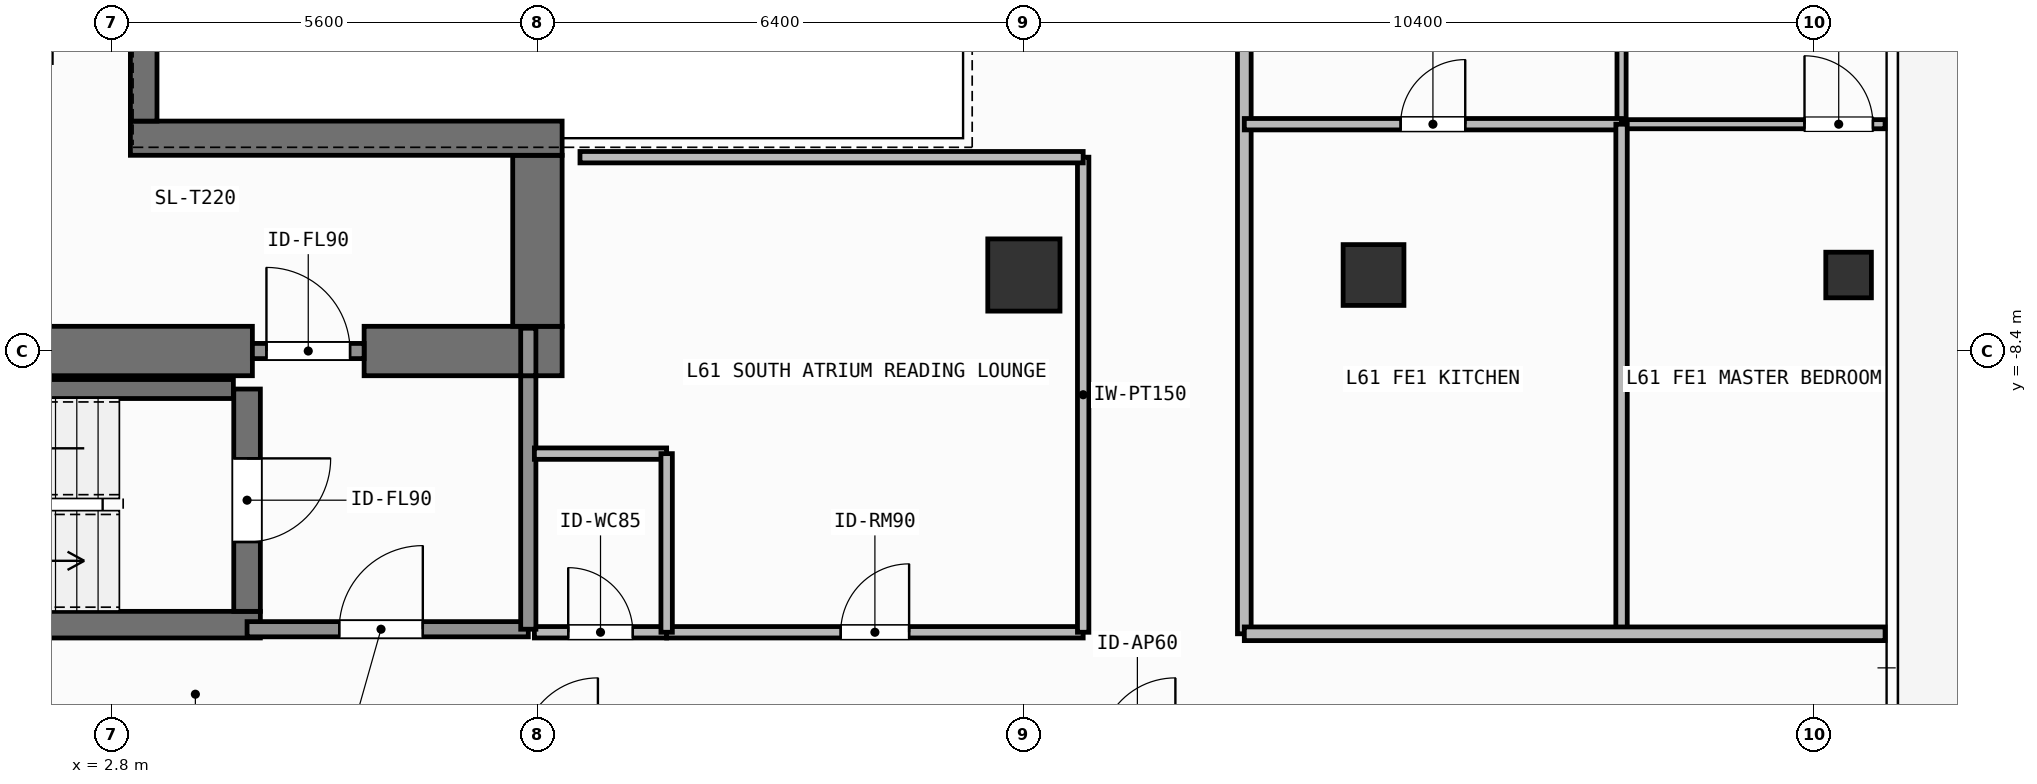
"""IFC4 building model, lengths in metres.
Left out: names, types, materials, properties, quantities, classifications, styles, units other than length and angle.
Written with IfcOpenShell. Run it as: python <this file> out.ifc"""

import sys

from ifc_helpers import new_model, si_unit, direction, frame, frame_2d, origin, origin_2d, place, context, subcontext, project, spatial, rectangle, hollow_rectangle, extrude, element, fill, save


model = new_model("IFC4")
c1 = context("Model", 3, precision=1e-05, world=origin(), true_north=direction((0.0, 1.0)))
c2 = subcontext(c1, "Body", "Model", "MODEL_VIEW")
j1 = project(units=[si_unit("LENGTHUNIT", "METRE"), si_unit("PLANEANGLEUNIT", "RADIAN")], contexts=[c1])
p1 = place(None, origin())
s1 = spatial("IfcSite", under=j1, at=p1, CompositionType="ELEMENT")
p2 = place(p1, origin())
s2 = spatial("IfcBuilding", under=s1, at=p2, CompositionType="ELEMENT")
p3 = place(p2, frame((0.0, 0.0, 250.8)))
s3 = spatial("IfcBuildingStorey", under=s2, at=p3, CompositionType="ELEMENT", Elevation=250.8)
p4 = place(p3, frame((-2.62, -8.4, 0.0), z_axis=(0.0, 0.0, 1.0), x_axis=(1.0, 0.0, 0.0)))
e1 = element("IfcWall", 1, at=p4, inside=s3, PredefinedType="SHEAR", context=c2, shape_type="SweptSolid", body=[
    extrude(rectangle(XDim=7.27, YDim=0.65, at=frame_2d((3.635, 0.0))), origin(), (0.0, 0.0, 1.0), 3.9),
])
p5 = place(p3, frame((6.12, -8.4, 0.0), z_axis=(0.0, 0.0, 1.0), x_axis=(1.0, 0.0, 0.0)))
e2 = element("IfcWall", 2, at=p5, inside=s3, PredefinedType="SHEAR", context=c2, shape_type="SweptSolid", body=[
    extrude(rectangle(XDim=2.605, YDim=0.65, at=frame_2d((1.302, 0.0))), origin(), (0.0, 0.0, 1.0), 3.9),
])
p6 = place(p3, frame((8.4, -8.075, 0.0), z_axis=(0.0, 0.0, 1.0), x_axis=(0.0, 1.0, 0.0)))
e3 = element("IfcWall", 3, at=p6, inside=s3, PredefinedType="SHEAR", context=c2, shape_type="SweptSolid", body=[
    extrude(rectangle(XDim=2.25, YDim=0.65, at=frame_2d((1.125, 0.0))), origin(), (0.0, 0.0, 1.0), 3.9),
])
p7 = place(p3, frame((3.045, -5.6, 0.0), z_axis=(0.0, 0.0, 1.0), x_axis=(1.0, 0.0, 0.0)))
e4 = element("IfcWall", 4, at=p7, inside=s3, PredefinedType="SHEAR", context=c2, shape_type="SweptSolid", body=[
    extrude(rectangle(XDim=5.68, YDim=0.45, at=frame_2d((2.84, 0.0))), origin(), (0.0, 0.0, 1.0), 3.9),
])
p8 = place(p3, frame((3.22, -5.375, 0.0), z_axis=(0.0, 0.0, 1.0), x_axis=(0.0, 1.0, 0.0)))
e5 = element("IfcWall", 5, at=p8, inside=s3, PredefinedType="SHEAR", context=c2, shape_type="SweptSolid", body=[
    extrude(rectangle(XDim=10.75, YDim=0.35, at=frame_2d((5.375, 0.0))), origin(), (0.0, 0.0, 1.0), 3.9),
])
p9 = place(p3, frame((-2.555, -12.0, 0.0), z_axis=(0.0, 0.0, 1.0), x_axis=(1.0, 0.0, 0.0)))
e6 = element("IfcWall", 6, at=p9, inside=s3, PredefinedType="SHEAR", context=c2, shape_type="SweptSolid", body=[
    extrude(rectangle(XDim=7.31, YDim=0.35, at=frame_2d((3.655, 0.0))), origin(), (0.0, 0.0, 1.0), 3.9),
])
p10 = place(p3, frame((-2.2, -8.9, 0.0), z_axis=(0.0, 0.0, 1.0), x_axis=(1.0, 0.0, 0.0)))
e7 = element("IfcWall", 7, at=p10, inside=s3, PredefinedType="SHEAR", context=c2, shape_type="SweptSolid", body=[
    extrude(rectangle(XDim=6.6, YDim=0.25, at=frame_2d((3.3, 0.0))), origin(), (0.0, 0.0, 1.0), 3.9),
])
p11 = place(p3, frame((4.58, -8.9, 0.0), z_axis=(0.0, 0.0, 1.0), x_axis=(0.0, -1.0, 0.0)))
e8 = element("IfcWall", 8, at=p11, inside=s3, PredefinedType="SHEAR", context=c2, shape_type="SweptSolid", body=[
    extrude(rectangle(XDim=2.925, YDim=0.35, at=frame_2d((1.462, 0.0))), origin(), (0.0, 0.0, 1.0), 3.9),
])
p12 = place(p11, frame((0.913, 0.0, 0.0)))
e9 = element("IfcOpeningElement", 9, at=p12, cuts=e8, PredefinedType="OPENING", context=c2, shape_type="SweptSolid", body=[
    extrude(rectangle(XDim=1.1, YDim=2.15, at=frame_2d((0.55, 1.075))), frame((0.0, 0.185, 0.0), z_axis=(0.0, -1.0, 0.0), x_axis=(1.0, 0.0, 0.0)), (0.0, 0.0, 1.0), 0.37),
])
p13 = place(p3, frame((14.8, -7.4, 0.0), z_axis=(0.0, 0.0, 1.0), x_axis=(1.0, 0.0, 0.0)))
e10 = element("IfcColumn", 10, at=p13, inside=s3, PredefinedType="COLUMN", context=c2, shape_type="SweptSolid", body=[
    extrude(rectangle(XDim=0.95, YDim=0.95, at=origin_2d()), origin(), (0.0, 0.0, 1.0), 3.9),
])
p14 = place(p3, frame((19.4, -7.4, 0.0), z_axis=(0.0, 0.0, 1.0), x_axis=(1.0, 0.0, 0.0)))
e11 = element("IfcColumn", 11, at=p14, inside=s3, PredefinedType="COLUMN", context=c2, shape_type="SweptSolid", body=[
    extrude(hollow_rectangle(XDim=0.8, YDim=0.8, WallThickness=0.036, at=origin_2d()), origin(), (0.0, 0.0, 1.0), 3.9),
])
p15 = place(p3, frame((25.65, -7.4, 0.0), z_axis=(0.0, 0.0, 1.0), x_axis=(1.0, 0.0, 0.0)))
e12 = element("IfcColumn", 12, at=p15, inside=s3, PredefinedType="COLUMN", context=c2, shape_type="SweptSolid", body=[
    extrude(hollow_rectangle(XDim=0.6, YDim=0.6, WallThickness=0.028, at=origin_2d()), origin(), (0.0, 0.0, 1.0), 3.9),
])
p16 = place(p3, frame((4.58, -12.06, 0.0), z_axis=(0.0, 0.0, 1.0), x_axis=(1.0, 0.0, 0.0)))
e13 = element("IfcWall", 13, at=p16, inside=s3, PredefinedType="SOLIDWALL", context=c2, shape_type="SweptSolid", body=[
    extrude(rectangle(XDim=3.7, YDim=0.2, at=frame_2d((1.85, 0.0))), origin(), (0.0, 0.0, 1.0), 3.62),
])
p17 = place(p16, frame((1.212, 0.0, 0.0)))
e14 = element("IfcOpeningElement", 14, at=p17, cuts=e13, PredefinedType="OPENING", context=c2, shape_type="SweptSolid", body=[
    extrude(rectangle(XDim=1.1, YDim=2.15, at=frame_2d((0.55, 1.075))), frame((0.0, 0.11, 0.0), z_axis=(0.0, -1.0, 0.0), x_axis=(1.0, 0.0, 0.0)), (0.0, 0.0, 1.0), 0.22),
])
p18 = place(p3, frame((4.65, -8.4, 0.0), z_axis=(0.0, 0.0, 1.0), x_axis=(1.0, 0.0, 0.0)))
e15 = element("IfcWall", 15, at=p18, inside=s3, PredefinedType="SOLIDWALL", context=c2, shape_type="SweptSolid", body=[
    extrude(rectangle(XDim=1.47, YDim=0.2, at=frame_2d((0.735, 0.0))), origin(), (0.0, 0.0, 1.0), 2.86),
])
p19 = place(p18, frame((0.185, 0.0, 0.0)))
e16 = element("IfcOpeningElement", 16, at=p19, cuts=e15, PredefinedType="OPENING", context=c2, shape_type="SweptSolid", body=[
    extrude(rectangle(XDim=1.1, YDim=2.15, at=frame_2d((0.55, 1.075))), frame((0.0, 0.11, 0.0), z_axis=(0.0, -1.0, 0.0), x_axis=(1.0, 0.0, 0.0)), (0.0, 0.0, 1.0), 0.22),
])
p20 = place(p3, frame((8.36, -12.1, 0.0), z_axis=(0.0, 0.0, 1.0), x_axis=(1.0, 0.0, 0.0)))
e17 = element("IfcWall", 17, at=p20, inside=s3, PredefinedType="PARTITIONING", context=c2, shape_type="SweptSolid", body=[
    extrude(rectangle(XDim=1.74, YDim=0.15, at=frame_2d((0.87, 0.0))), origin(), (0.0, 0.0, 1.0), 3.62),
])
p21 = place(p20, frame((0.445, 0.0, 0.0)))
e18 = element("IfcOpeningElement", 18, at=p21, cuts=e17, PredefinedType="OPENING", context=c2, shape_type="SweptSolid", body=[
    extrude(rectangle(XDim=0.85, YDim=2.1, at=frame_2d((0.425, 1.05))), frame((0.0, 0.085, 0.0), z_axis=(0.0, -1.0, 0.0), x_axis=(1.0, 0.0, 0.0)), (0.0, 0.0, 1.0), 0.17),
])
p22 = place(p3, frame((10.1, -12.1, 0.0), z_axis=(0.0, 0.0, 1.0), x_axis=(1.0, 0.0, 0.0)))
e19 = element("IfcWall", 19, at=p22, inside=s3, PredefinedType="PARTITIONING", context=c2, shape_type="SweptSolid", body=[
    extrude(rectangle(XDim=5.48, YDim=0.15, at=frame_2d((2.74, 0.0))), origin(), (0.0, 0.0, 1.0), 3.62),
])
p23 = place(p22, frame((2.29, 0.0, 0.0)))
e20 = element("IfcOpeningElement", 20, at=p23, cuts=e19, PredefinedType="OPENING", context=c2, shape_type="SweptSolid", body=[
    extrude(rectangle(XDim=0.9, YDim=2.1, at=frame_2d((0.45, 1.05))), frame((0.0, 0.085, 0.0), z_axis=(0.0, -1.0, 0.0), x_axis=(1.0, 0.0, 0.0)), (0.0, 0.0, 1.0), 0.17),
])
p24 = place(p3, frame((17.7, -12.12, 0.0), z_axis=(0.0, 0.0, 1.0), x_axis=(0.0, 1.0, 0.0)))
e21 = element("IfcWall", 21, at=p24, inside=s3, PredefinedType="PARTITIONING", context=c2, shape_type="SweptSolid", body=[
    extrude(rectangle(XDim=23.55, YDim=0.18, at=frame_2d((11.775, 0.0))), origin(), (0.0, 0.0, 1.0), 3.62),
])
p25 = place(p24, frame((11.454, 0.0, 0.0)))
e22 = element("IfcOpeningElement", 22, at=p25, cuts=e21, PredefinedType="OPENING", context=c2, shape_type="SweptSolid", body=[
    extrude(rectangle(XDim=1.0, YDim=2.2, at=frame_2d((0.5, 1.1))), frame((0.0, 0.1, 0.0), z_axis=(0.0, -1.0, 0.0), x_axis=(1.0, 0.0, 0.0)), (0.0, 0.0, 1.0), 0.2),
])
p26 = place(p3, frame((22.663, -5.416, 0.0), z_axis=(0.0, 0.0, 1.0), x_axis=(0.0, 1.0, 0.0)))
e23 = element("IfcWall", 23, at=p26, inside=s3, PredefinedType="PARTITIONING", context=c2, shape_type="SweptSolid", body=[
    extrude(rectangle(XDim=10.698, YDim=0.12, at=frame_2d((5.349, 0.0))), origin(), (0.0, 0.0, 1.0), 3.62),
])
p27 = place(p26, frame((4.81, 0.0, 0.0)))
e24 = element("IfcOpeningElement", 24, at=p27, cuts=e23, PredefinedType="OPENING", context=c2, shape_type="SweptSolid", body=[
    extrude(rectangle(XDim=0.9, YDim=2.1, at=frame_2d((0.45, 1.05))), frame((0.0, 0.07, 0.0), z_axis=(0.0, -1.0, 0.0), x_axis=(1.0, 0.0, 0.0)), (0.0, 0.0, 1.0), 0.14),
])
p28 = place(p3, frame((17.7, -5.416, 0.0), z_axis=(0.0, 0.0, 1.0), x_axis=(1.0, 0.0, 0.0)))
e25 = element("IfcWall", 25, at=p28, inside=s3, PredefinedType="PARTITIONING", context=c2, shape_type="SweptSolid", body=[
    extrude(rectangle(XDim=4.963, YDim=0.15, at=frame_2d((2.481, 0.0))), origin(), (0.0, 0.0, 1.0), 3.62),
])
p29 = place(p28, frame((2.056, 0.0, 0.0)))
e26 = element("IfcOpeningElement", 26, at=p29, cuts=e25, PredefinedType="OPENING", context=c2, shape_type="SweptSolid", body=[
    extrude(rectangle(XDim=0.85, YDim=2.1, at=frame_2d((0.425, 1.05))), frame((0.0, 0.085, 0.0), z_axis=(0.0, -1.0, 0.0), x_axis=(1.0, 0.0, 0.0)), (0.0, 0.0, 1.0), 0.17),
])
p30 = place(p3, frame((22.663, -5.416, 0.0), z_axis=(0.0, 0.0, 1.0), x_axis=(1.0, 0.0, 0.0)))
e27 = element("IfcWall", 27, at=p30, inside=s3, PredefinedType="PARTITIONING", context=c2, shape_type="SweptSolid", body=[
    extrude(rectangle(XDim=3.467, YDim=0.12, at=frame_2d((1.733, 0.0))), origin(), (0.0, 0.0, 1.0), 3.62),
])
p31 = place(p30, frame((2.407, 0.0, 0.0)))
e28 = element("IfcOpeningElement", 28, at=p31, cuts=e27, PredefinedType="OPENING", context=c2, shape_type="SweptSolid", body=[
    extrude(rectangle(XDim=0.9, YDim=2.1, at=frame_2d((0.45, 1.05))), frame((0.0, 0.07, 0.0), z_axis=(0.0, -1.0, 0.0), x_axis=(1.0, 0.0, 0.0)), (0.0, 0.0, 1.0), 0.14),
])
p32 = place(p3, frame((8.28, -12.06, 0.0), z_axis=(0.0, 0.0, 1.0), x_axis=(0.0, 1.0, 0.0)))
e29 = element("IfcWall", 29, at=p32, inside=s3, PredefinedType="SOLIDWALL", context=c2, shape_type="SweptSolid", body=[
    extrude(rectangle(XDim=3.335, YDim=0.2, at=frame_2d((1.667, 0.0))), origin(), (0.0, 0.0, 1.0), 3.62),
])
p33 = place(p3, frame((8.28, -8.725, 0.0), z_axis=(0.0, 0.0, 1.0), x_axis=(0.0, 1.0, 0.0)))
e30 = element("IfcWall", 30, at=p33, inside=s3, PredefinedType="SOLIDWALL", context=c2, shape_type="SweptSolid", body=[
    extrude(rectangle(XDim=0.625, YDim=0.2, at=frame_2d((0.312, 0.0))), origin(), (0.0, 0.0, 1.0), 3.62),
])
p34 = place(p3, frame((8.36, -9.75, 0.0), z_axis=(0.0, 0.0, 1.0), x_axis=(1.0, 0.0, 0.0)))
e31 = element("IfcWall", 31, at=p34, inside=s3, PredefinedType="PARTITIONING", context=c2, shape_type="SweptSolid", body=[
    extrude(rectangle(XDim=1.74, YDim=0.15, at=frame_2d((0.87, 0.0))), origin(), (0.0, 0.0, 1.0), 3.62),
])
p35 = place(p3, frame((10.1, -12.1, 0.0), z_axis=(0.0, 0.0, 1.0), x_axis=(0.0, 1.0, 0.0)))
e32 = element("IfcWall", 32, at=p35, inside=s3, PredefinedType="PARTITIONING", context=c2, shape_type="SweptSolid", body=[
    extrude(rectangle(XDim=2.35, YDim=0.15, at=frame_2d((1.175, 0.0))), origin(), (0.0, 0.0, 1.0), 3.62),
])
p36 = place(p3, frame((15.58, -12.1, 0.0), z_axis=(0.0, 0.0, 1.0), x_axis=(0.0, 1.0, 0.0)))
e33 = element("IfcWall", 33, at=p36, inside=s3, PredefinedType="PARTITIONING", context=c2, shape_type="SweptSolid", body=[
    extrude(rectangle(XDim=6.25, YDim=0.15, at=frame_2d((3.125, 0.0))), origin(), (0.0, 0.0, 1.0), 3.62),
])
p37 = place(p3, frame((8.96, -5.85, 0.0), z_axis=(0.0, 0.0, 1.0), x_axis=(1.0, 0.0, 0.0)))
e34 = element("IfcWall", 34, at=p37, inside=s3, PredefinedType="PARTITIONING", context=c2, shape_type="SweptSolid", body=[
    extrude(rectangle(XDim=6.62, YDim=0.15, at=frame_2d((3.31, 0.0))), origin(), (0.0, 0.0, 1.0), 3.62),
])
p38 = place(p3, frame((22.663, -12.12, 0.0), z_axis=(0.0, 0.0, 1.0), x_axis=(0.0, 1.0, 0.0)))
e35 = element("IfcWall", 35, at=p38, inside=s3, PredefinedType="PARTITIONING", context=c2, shape_type="SweptSolid", body=[
    extrude(rectangle(XDim=6.704, YDim=0.15, at=frame_2d((3.352, 0.0))), origin(), (0.0, 0.0, 1.0), 3.62),
])
p39 = place(p3, frame((17.7, -12.12, 0.0), z_axis=(0.0, 0.0, 1.0), x_axis=(1.0, 0.0, 0.0)))
e36 = element("IfcWall", 36, at=p39, inside=s3, PredefinedType="PARTITIONING", context=c2, shape_type="SweptSolid", body=[
    extrude(rectangle(XDim=8.43, YDim=0.18, at=frame_2d((4.215, 0.0))), origin(), (0.0, 0.0, 1.0), 3.62),
])
p40 = place(p12, origin())
e37 = element("IfcDoor", 37, at=p40, inside=s3, OperationType="SINGLE_SWING_LEFT", PredefinedType="DOOR", context=c2, shape_type="SweptSolid", body=[
    extrude(rectangle(XDim=1.1, YDim=2.15, at=frame_2d((0.55, 1.075))), frame((0.0, 0.025, 0.0), z_axis=(0.0, -1.0, 0.0), x_axis=(1.0, 0.0, 0.0)), (0.0, 0.0, 1.0), 0.05),
])
fill(e9, e37)
p41 = place(p17, origin())
e38 = element("IfcDoor", 38, at=p41, inside=s3, OperationType="SINGLE_SWING_RIGHT", PredefinedType="DOOR", context=c2, shape_type="SweptSolid", body=[
    extrude(rectangle(XDim=1.1, YDim=2.15, at=frame_2d((0.55, 1.075))), frame((0.0, 0.025, 0.0), z_axis=(0.0, -1.0, 0.0), x_axis=(1.0, 0.0, 0.0)), (0.0, 0.0, 1.0), 0.05),
])
fill(e14, e38)
p42 = place(p19, origin())
e39 = element("IfcDoor", 39, at=p42, inside=s3, OperationType="SINGLE_SWING_LEFT", PredefinedType="DOOR", context=c2, shape_type="SweptSolid", body=[
    extrude(rectangle(XDim=1.1, YDim=2.15, at=frame_2d((0.55, 1.075))), frame((0.0, 0.025, 0.0), z_axis=(0.0, -1.0, 0.0), x_axis=(1.0, 0.0, 0.0)), (0.0, 0.0, 1.0), 0.05),
])
fill(e16, e39)
p43 = place(p21, origin())
e40 = element("IfcDoor", 40, at=p43, inside=s3, OperationType="SINGLE_SWING_LEFT", PredefinedType="DOOR", context=c2, shape_type="SweptSolid", body=[
    extrude(rectangle(XDim=0.85, YDim=2.1, at=frame_2d((0.425, 1.05))), frame((0.0, 0.025, 0.0), z_axis=(0.0, -1.0, 0.0), x_axis=(1.0, 0.0, 0.0)), (0.0, 0.0, 1.0), 0.05),
])
fill(e18, e40)
p44 = place(p23, origin())
e41 = element("IfcDoor", 41, at=p44, inside=s3, OperationType="SINGLE_SWING_RIGHT", PredefinedType="DOOR", context=c2, shape_type="SweptSolid", body=[
    extrude(rectangle(XDim=0.9, YDim=2.1, at=frame_2d((0.45, 1.05))), frame((0.0, 0.025, 0.0), z_axis=(0.0, -1.0, 0.0), x_axis=(1.0, 0.0, 0.0)), (0.0, 0.0, 1.0), 0.05),
])
fill(e20, e41)
p45 = place(p29, origin())
e42 = element("IfcDoor", 42, at=p45, inside=s3, OperationType="SINGLE_SWING_RIGHT", PredefinedType="DOOR", context=c2, shape_type="SweptSolid", body=[
    extrude(rectangle(XDim=0.85, YDim=2.1, at=frame_2d((0.425, 1.05))), frame((0.0, 0.025, 0.0), z_axis=(0.0, -1.0, 0.0), x_axis=(1.0, 0.0, 0.0)), (0.0, 0.0, 1.0), 0.05),
])
fill(e26, e42)
p46 = place(p31, origin())
e43 = element("IfcDoor", 43, at=p46, inside=s3, OperationType="SINGLE_SWING_LEFT", PredefinedType="DOOR", context=c2, shape_type="SweptSolid", body=[
    extrude(rectangle(XDim=0.9, YDim=2.1, at=frame_2d((0.45, 1.05))), frame((0.0, 0.025, 0.0), z_axis=(0.0, -1.0, 0.0), x_axis=(1.0, 0.0, 0.0)), (0.0, 0.0, 1.0), 0.05),
])
fill(e28, e43)
save(model, sys.argv[1])
